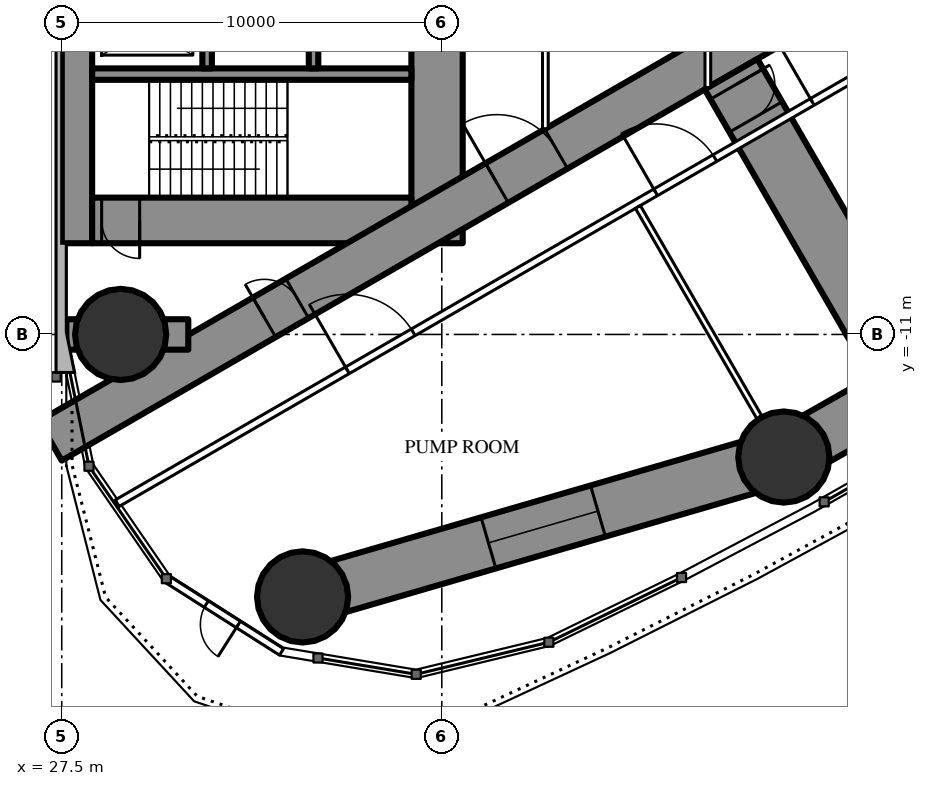
"""IFC4 building model, lengths in metres.
Left out: names, types, materials, properties, quantities, classifications, styles, units other than length and angle.
Written with IfcOpenShell. Run it as: python <this file> out.ifc"""

import sys

from ifc_helpers import new_model, si_unit, direction, frame, frame_2d, origin, origin_2d, place, context, subcontext, project, spatial, rectangle, circle, hollow_circle, extrude, element, fill, save


model = new_model("IFC4")
c1 = context("Model", 3, precision=1e-05, world=origin(), true_north=direction((0.0, 1.0)))
c2 = subcontext(c1, "Body", "Model", "MODEL_VIEW")
j1 = project(units=[si_unit("LENGTHUNIT", "METRE"), si_unit("PLANEANGLEUNIT", "RADIAN")], contexts=[c1])
p1 = place(None, origin())
s1 = spatial("IfcSite", under=j1, at=p1, CompositionType="ELEMENT")
p2 = place(p1, origin())
s2 = spatial("IfcBuilding", under=s1, at=p2, CompositionType="ELEMENT")
p3 = place(p2, frame((0.0, 0.0, 210.3)))
s3 = spatial("IfcBuildingStorey", under=s2, at=p3, CompositionType="ELEMENT", Elevation=210.3)
p4 = place(p3, frame((33.837, -17.906, 0.0), z_axis=(0.0, 0.0, 1.0), x_axis=(1.0, 0.0, 0.0)))
e1 = element("IfcColumn", 1, at=p4, inside=s3, PredefinedType="COLUMN", context=c2, shape_type="SweptSolid", body=[
    extrude(circle(Radius=1.2, at=origin_2d()), origin(), (0.0, 0.0, 1.0), 5.0),
])
p5 = place(p3, frame((29.05, -11.0, 0.0), z_axis=(0.0, 0.0, 1.0), x_axis=(1.0, 0.0, 0.0)))
e2 = element("IfcColumn", 2, at=p5, inside=s3, PredefinedType="COLUMN", context=c2, shape_type="SweptSolid", body=[
    extrude(hollow_circle(Radius=1.2, WallThickness=0.09, at=origin_2d()), origin(), (0.0, 0.0, 1.0), 5.0),
])
p6 = place(p3, frame((46.499, -14.226, 0.0), z_axis=(0.0, 0.0, 1.0), x_axis=(1.0, 0.0, 0.0)))
e3 = element("IfcColumn", 3, at=p6, inside=s3, PredefinedType="COLUMN", context=c2, shape_type="SweptSolid", body=[
    extrude(circle(Radius=1.2, at=origin_2d()), origin(), (0.0, 0.0, 1.0), 5.0),
])
p7 = place(p3, frame((27.9, -8.6, 0.0), z_axis=(0.0, 0.0, 1.0), x_axis=(0.0, 1.0, 0.0)))
e4 = element("IfcWall", 4, at=p7, inside=s3, PredefinedType="SHEAR", context=c2, shape_type="SweptSolid", body=[
    extrude(rectangle(XDim=17.2, YDim=0.8, at=frame_2d((8.6, 0.0))), origin(), (0.0, 0.0, 1.0), 5.0),
])
p8 = place(p7, frame((9.35, 0.0, 0.0)))
e5 = element("IfcOpeningElement", 5, at=p8, cuts=e4, PredefinedType="OPENING", context=c2, shape_type="SweptSolid", body=[
    extrude(rectangle(XDim=0.9, YDim=2.2, at=frame_2d((0.45, 1.1))), frame((0.0, 0.41, 0.0), z_axis=(0.0, -1.0, 0.0), x_axis=(1.0, 0.0, 0.0)), (0.0, 0.0, 1.0), 0.82),
])
p9 = place(p3, frame((37.375, -8.6, 0.0), z_axis=(0.0, 0.0, 1.0), x_axis=(0.0, 1.0, 0.0)))
e6 = element("IfcWall", 6, at=p9, inside=s3, PredefinedType="SHEAR", context=c2, shape_type="SweptSolid", body=[
    extrude(rectangle(XDim=17.2, YDim=1.35, at=frame_2d((8.6, 0.0))), origin(), (0.0, 0.0, 1.0), 5.0),
])
p10 = place(p9, frame((7.7, 0.0, 0.0)))
e7 = element("IfcOpeningElement", 7, at=p10, cuts=e6, PredefinedType="OPENING", context=c2, shape_type="SweptSolid", body=[
    extrude(rectangle(XDim=1.8, YDim=2.2, at=frame_2d((0.9, 1.1))), frame((0.0, 0.685, 0.0), z_axis=(0.0, -1.0, 0.0), x_axis=(1.0, 0.0, 0.0)), (0.0, 0.0, 1.0), 1.37),
])
p11 = place(p3, frame((28.3, -8.0, 0.0), z_axis=(0.0, 0.0, 1.0), x_axis=(1.0, 0.0, 0.0)))
e8 = element("IfcWall", 8, at=p11, inside=s3, PredefinedType="SHEAR", context=c2, shape_type="SweptSolid", body=[
    extrude(rectangle(XDim=8.4, YDim=1.2, at=frame_2d((4.2, 0.0))), origin(), (0.0, 0.0, 1.0), 5.0),
])
p12 = place(p11, frame((0.25, 0.0, 0.0)))
e9 = element("IfcOpeningElement", 9, at=p12, cuts=e8, PredefinedType="OPENING", context=c2, shape_type="SweptSolid", body=[
    extrude(rectangle(XDim=1.0, YDim=2.2, at=frame_2d((0.5, 1.1))), frame((0.0, 0.61, 0.0), z_axis=(0.0, -1.0, 0.0), x_axis=(1.0, 0.0, 0.0)), (0.0, 0.0, 1.0), 1.22),
])
p13 = place(p3, frame((28.3, -4.15, 0.0), z_axis=(0.0, 0.0, 1.0), x_axis=(1.0, 0.0, 0.0)))
e10 = element("IfcWall", 10, at=p13, inside=s3, PredefinedType="SHEAR", context=c2, shape_type="SweptSolid", body=[
    extrude(rectangle(XDim=8.4, YDim=0.3, at=frame_2d((4.2, 0.0))), origin(), (0.0, 0.0, 1.0), 5.0),
])
p14 = place(p3, frame((31.325, -4.0, 0.0), z_axis=(0.0, 0.0, 1.0), x_axis=(0.0, 1.0, 0.0)))
e11 = element("IfcWall", 11, at=p14, inside=s3, PredefinedType="SHEAR", context=c2, shape_type="SweptSolid", body=[
    extrude(rectangle(XDim=2.1, YDim=0.25, at=frame_2d((1.05, 0.0))), origin(), (0.0, 0.0, 1.0), 5.0),
])
p15 = place(p14, frame((0.5, 0.0, 0.0)))
e12 = element("IfcOpeningElement", 12, at=p15, cuts=e11, PredefinedType="OPENING", context=c2, shape_type="SweptSolid", body=[
    extrude(rectangle(XDim=1.1, YDim=2.2, at=frame_2d((0.55, 1.1))), frame((0.0, 0.135, 0.0), z_axis=(0.0, -1.0, 0.0), x_axis=(1.0, 0.0, 0.0)), (0.0, 0.0, 1.0), 0.27),
])
p16 = place(p3, frame((34.125, -4.0, 0.0), z_axis=(0.0, 0.0, 1.0), x_axis=(0.0, 1.0, 0.0)))
e13 = element("IfcWall", 13, at=p16, inside=s3, PredefinedType="SHEAR", context=c2, shape_type="SweptSolid", body=[
    extrude(rectangle(XDim=2.35, YDim=0.25, at=frame_2d((1.175, 0.0))), origin(), (0.0, 0.0, 1.0), 5.0),
])
p17 = place(p3, frame((27.2, -13.8, 0.0), z_axis=(0.0, 0.0, 1.0), x_axis=(0.866027159892, 0.499996958321, 0.0)))
e14 = element("IfcWall", 14, at=p17, inside=s3, PredefinedType="SHEAR", context=c2, shape_type="SweptSolid", body=[
    extrude(rectangle(XDim=27.947, YDim=1.2, at=frame_2d((13.973, 0.0))), origin(), (0.0, 0.0, 1.0), 5.0),
])
p18 = place(p17, frame((6.5, 0.0, 0.0)))
e15 = element("IfcOpeningElement", 15, at=p18, cuts=e14, PredefinedType="OPENING", context=c2, shape_type="SweptSolid", body=[
    extrude(rectangle(XDim=1.0, YDim=2.2, at=frame_2d((0.5, 1.1))), frame((0.0, 0.61, 0.0), z_axis=(0.0, -1.0, 0.0), x_axis=(1.0, 0.0, 0.0)), (0.0, 0.0, 1.0), 1.22),
])
p19 = place(p17, frame((13.568, 0.0, 0.0)))
e16 = element("IfcOpeningElement", 16, at=p19, cuts=e14, PredefinedType="OPENING", context=c2, shape_type="SweptSolid", body=[
    extrude(rectangle(XDim=1.8, YDim=2.2, at=frame_2d((0.9, 1.1))), frame((0.0, 0.61, 0.0), z_axis=(0.0, -1.0, 0.0), x_axis=(1.0, 0.0, 0.0)), (0.0, 0.0, 1.0), 1.22),
])
p20 = place(p3, frame((27.62, -11.0, 0.0), z_axis=(0.0, 0.0, 1.0), x_axis=(1.0, 0.0, 0.0)))
e17 = element("IfcWall", 17, at=p20, inside=s3, PredefinedType="SHEAR", context=c2, shape_type="SweptSolid", body=[
    extrude(rectangle(XDim=3.209, YDim=0.8, at=frame_2d((1.605, 0.0))), origin(), (0.0, 0.0, 1.0), 5.0),
])
p21 = place(p3, frame((45.111, -4.152, 0.0), z_axis=(0.0, 0.0, 1.0), x_axis=(0.499986466662, -0.86603321712, 0.0)))
e18 = element("IfcWall", 18, at=p21, inside=s3, PredefinedType="SHEAR", context=c2, shape_type="SweptSolid", body=[
    extrude(rectangle(XDim=9.446, YDim=1.6, at=frame_2d((4.723, 0.0))), origin(), (0.0, 0.0, 1.0), 5.0),
])
p22 = place(p21, frame((0.3, 0.0, 0.0)))
e19 = element("IfcOpeningElement", 19, at=p22, cuts=e18, PredefinedType="OPENING", context=c2, shape_type="SweptSolid", body=[
    extrude(rectangle(XDim=1.0, YDim=2.2, at=frame_2d((0.5, 1.1))), frame((0.0, 0.81, 0.0), z_axis=(0.0, -1.0, 0.0), x_axis=(1.0, 0.0, 0.0)), (0.0, 0.0, 1.0), 1.62),
])
p23 = place(p3, frame((33.837, -17.906, 0.0), z_axis=(0.0, 0.0, 1.0), x_axis=(0.960258384252, 0.279112585659, 0.0)))
e20 = element("IfcWall", 20, at=p23, inside=s3, PredefinedType="SHEAR", context=c2, shape_type="SweptSolid", body=[
    extrude(rectangle(XDim=13.186, YDim=1.4, at=frame_2d((6.593, 0.0))), origin(), (0.0, 0.0, 1.0), 5.0),
])
p24 = place(p23, frame((5.093, 0.0, 0.6)))
e21 = element("IfcOpeningElement", 21, at=p24, cuts=e20, PredefinedType="OPENING", context=c2, shape_type="SweptSolid", body=[
    extrude(rectangle(XDim=3.0, YDim=1.2, at=frame_2d((1.5, 0.6))), frame((0.0, 0.71, 0.0), z_axis=(0.0, -1.0, 0.0), x_axis=(1.0, 0.0, 0.0)), (0.0, 0.0, 1.0), 1.42),
])
p25 = place(p3, frame((46.499, -14.226, 0.0), z_axis=(0.0, 0.0, 1.0), x_axis=(0.869560321562, 0.493826738001, 0.0)))
e22 = element("IfcWall", 22, at=p25, inside=s3, PredefinedType="SHEAR", context=c2, shape_type="SweptSolid", body=[
    extrude(rectangle(XDim=3.835, YDim=1.4, at=frame_2d((1.917, 0.0))), origin(), (0.0, 0.0, 1.0), 5.0),
])
p26 = place(p3, frame((33.283, -19.354, 0.0), z_axis=(0.0, 0.0, 1.0), x_axis=(-0.843840574659, 0.536593966196, 0.0)))
e23 = element("IfcWall", 23, at=p26, inside=s3, PredefinedType="STANDARD", context=c2, shape_type="SweptSolid", body=[
    extrude(rectangle(XDim=3.592, YDim=0.2, at=frame_2d((1.796, 0.0))), origin(), (0.0, 0.0, 1.0), 4.75),
])
p27 = place(p26, frame((1.346, 0.0, 0.0)))
e24 = element("IfcOpeningElement", 24, at=p27, cuts=e23, PredefinedType="OPENING", context=c2, shape_type="SweptSolid", body=[
    extrude(rectangle(XDim=1.0, YDim=2.2, at=frame_2d((0.5, 1.1))), frame((0.0, 0.11, 0.0), z_axis=(0.0, -1.0, 0.0), x_axis=(1.0, 0.0, 0.0)), (0.0, 0.0, 1.0), 0.22),
])
p28 = place(p3, frame((28.959, -15.44, 0.0), z_axis=(0.0, 0.0, 1.0), x_axis=(0.866025227435, 0.500000305447, 0.0)))
e25 = element("IfcWall", 25, at=p28, inside=s3, PredefinedType="PARTITIONING", context=c2, shape_type="SweptSolid", body=[
    extrude(rectangle(XDim=30.88, YDim=0.2, at=frame_2d((15.44, 0.0))), origin(), (0.0, 0.0, 1.0), 4.75),
])
p29 = place(p28, frame((6.994, 0.0, 0.0)))
e26 = element("IfcOpeningElement", 26, at=p29, cuts=e25, PredefinedType="OPENING", context=c2, shape_type="SweptSolid", body=[
    extrude(rectangle(XDim=2.0, YDim=2.4, at=frame_2d((1.0, 1.2))), frame((0.0, 0.11, 0.0), z_axis=(0.0, -1.0, 0.0), x_axis=(1.0, 0.0, 0.0)), (0.0, 0.0, 1.0), 0.22),
])
p30 = place(p28, frame((16.36, 0.0, 0.0)))
e27 = element("IfcOpeningElement", 27, at=p30, cuts=e25, PredefinedType="OPENING", context=c2, shape_type="SweptSolid", body=[
    extrude(rectangle(XDim=1.8, YDim=2.2, at=frame_2d((0.9, 1.1))), frame((0.0, 0.11, 0.0), z_axis=(0.0, -1.0, 0.0), x_axis=(1.0, 0.0, 0.0)), (0.0, 0.0, 1.0), 0.22),
])
p31 = place(p28, frame((21.118, 0.0, 0.0)))
e28 = element("IfcOpeningElement", 28, at=p31, cuts=e25, PredefinedType="OPENING", context=c2, shape_type="SweptSolid", body=[
    extrude(rectangle(XDim=1.8, YDim=2.2, at=frame_2d((0.9, 1.1))), frame((0.0, 0.11, 0.0), z_axis=(0.0, -1.0, 0.0), x_axis=(1.0, 0.0, 0.0)), (0.0, 0.0, 1.0), 0.22),
])
p32 = place(p28, frame((25.341, 0.0, 0.0)))
e29 = element("IfcOpeningElement", 29, at=p32, cuts=e25, PredefinedType="OPENING", context=c2, shape_type="SweptSolid", body=[
    extrude(rectangle(XDim=1.8, YDim=2.2, at=frame_2d((0.9, 1.1))), frame((0.0, 0.11, 0.0), z_axis=(0.0, -1.0, 0.0), x_axis=(1.0, 0.0, 0.0)), (0.0, 0.0, 1.0), 0.22),
])
p33 = place(p3, frame((42.66, -7.646, 0.0), z_axis=(0.0, 0.0, 1.0), x_axis=(0.499996592859, -0.866027370889, 0.0)))
e30 = element("IfcWall", 30, at=p33, inside=s3, PredefinedType="PARTITIONING", context=c2, shape_type="SweptSolid", body=[
    extrude(rectangle(XDim=6.398, YDim=0.15, at=frame_2d((3.199, 0.0))), origin(), (0.0, 0.0, 1.0), 3.85),
])
p34 = place(p3, frame((40.225, -5.587, 0.0), z_axis=(0.0, 0.0, 1.0), x_axis=(0.0, 1.0, 0.0)))
e31 = element("IfcWall", 31, at=p34, inside=s3, PredefinedType="PARTITIONING", context=c2, shape_type="SweptSolid", body=[
    extrude(rectangle(XDim=11.174, YDim=0.15, at=frame_2d((5.587, 0.0))), origin(), (0.0, 0.0, 1.0), 4.75),
])
p35 = place(p34, frame((4.687, 0.0, 0.0)))
e32 = element("IfcOpeningElement", 32, at=p35, cuts=e31, PredefinedType="OPENING", context=c2, shape_type="SweptSolid", body=[
    extrude(rectangle(XDim=1.8, YDim=2.2, at=frame_2d((0.9, 1.1))), frame((0.0, 0.085, 0.0), z_axis=(0.0, -1.0, 0.0), x_axis=(1.0, 0.0, 0.0)), (0.0, 0.0, 1.0), 0.17),
])
p36 = place(p3, frame((44.5, -4.505, 0.0), z_axis=(0.0, 0.0, 1.0), x_axis=(0.0, 1.0, 0.0)))
e33 = element("IfcWall", 33, at=p36, inside=s3, PredefinedType="PARTITIONING", context=c2, shape_type="SweptSolid", body=[
    extrude(rectangle(XDim=9.009, YDim=0.15, at=frame_2d((4.505, 0.0))), origin(), (0.0, 0.0, 1.0), 4.75),
])
p37 = place(p36, frame((4.005, 0.0, 0.0)))
e34 = element("IfcOpeningElement", 34, at=p37, cuts=e33, PredefinedType="OPENING", context=c2, shape_type="SweptSolid", body=[
    extrude(rectangle(XDim=1.0, YDim=2.2, at=frame_2d((0.5, 1.1))), frame((0.0, 0.085, 0.0), z_axis=(0.0, -1.0, 0.0), x_axis=(1.0, 0.0, 0.0)), (0.0, 0.0, 1.0), 0.17),
])
p38 = place(p24, origin())
e35 = element("IfcWindow", 35, at=p38, inside=s3, PartitioningType="SINGLE_PANEL", PredefinedType="WINDOW", context=c2, shape_type="SweptSolid", body=[
    extrude(rectangle(XDim=3.0, YDim=1.2, at=frame_2d((1.5, 0.6))), frame((0.0, 0.03, 0.0), z_axis=(0.0, -1.0, 0.0), x_axis=(1.0, 0.0, 0.0)), (0.0, 0.0, 1.0), 0.06),
])
fill(e21, e35)
p39 = place(p27, origin())
e36 = element("IfcDoor", 36, at=p39, inside=s3, OperationType="SINGLE_SWING_LEFT", PredefinedType="DOOR", context=c2, shape_type="SweptSolid", body=[
    extrude(rectangle(XDim=1.0, YDim=2.2, at=frame_2d((0.5, 1.1))), frame((0.0, 0.025, 0.0), z_axis=(0.0, -1.0, 0.0), x_axis=(1.0, 0.0, 0.0)), (0.0, 0.0, 1.0), 0.05),
])
fill(e24, e36)
p40 = place(p22, origin())
e37 = element("IfcDoor", 37, at=p40, inside=s3, OperationType="SINGLE_SWING_LEFT", PredefinedType="DOOR", context=c2, shape_type="SweptSolid", body=[
    extrude(rectangle(XDim=1.0, YDim=2.2, at=frame_2d((0.5, 1.1))), frame((0.0, 0.025, 0.0), z_axis=(0.0, -1.0, 0.0), x_axis=(1.0, 0.0, 0.0)), (0.0, 0.0, 1.0), 0.05),
])
fill(e19, e37)
p41 = place(p29, origin())
e38 = element("IfcDoor", 38, at=p41, inside=s3, OperationType="DOUBLE_DOOR_SINGLE_SWING", PredefinedType="DOOR", context=c2, shape_type="SweptSolid", body=[
    extrude(rectangle(XDim=2.0, YDim=2.4, at=frame_2d((1.0, 1.2))), frame((0.0, 0.025, 0.0), z_axis=(0.0, -1.0, 0.0), x_axis=(1.0, 0.0, 0.0)), (0.0, 0.0, 1.0), 0.05),
])
fill(e26, e38)
p42 = place(p30, origin())
e39 = element("IfcDoor", 39, at=p42, inside=s3, OperationType="DOUBLE_DOOR_SINGLE_SWING", PredefinedType="DOOR", context=c2, shape_type="SweptSolid", body=[
    extrude(rectangle(XDim=1.8, YDim=2.2, at=frame_2d((0.9, 1.1))), frame((0.0, 0.025, 0.0), z_axis=(0.0, -1.0, 0.0), x_axis=(1.0, 0.0, 0.0)), (0.0, 0.0, 1.0), 0.05),
])
fill(e27, e39)
p43 = place(p31, origin())
e40 = element("IfcDoor", 40, at=p43, inside=s3, OperationType="DOUBLE_DOOR_SINGLE_SWING", PredefinedType="DOOR", context=c2, shape_type="SweptSolid", body=[
    extrude(rectangle(XDim=1.8, YDim=2.2, at=frame_2d((0.9, 1.1))), frame((0.0, 0.025, 0.0), z_axis=(0.0, -1.0, 0.0), x_axis=(1.0, 0.0, 0.0)), (0.0, 0.0, 1.0), 0.05),
])
fill(e28, e40)
p44 = place(p18, origin())
e41 = element("IfcDoor", 41, at=p44, inside=s3, OperationType="SINGLE_SWING_LEFT", PredefinedType="DOOR", context=c2, shape_type="SweptSolid", body=[
    extrude(rectangle(XDim=1.0, YDim=2.2, at=frame_2d((0.5, 1.1))), frame((0.0, 0.025, 0.0), z_axis=(0.0, -1.0, 0.0), x_axis=(1.0, 0.0, 0.0)), (0.0, 0.0, 1.0), 0.05),
])
fill(e15, e41)
p45 = place(p19, origin())
e42 = element("IfcDoor", 42, at=p45, inside=s3, OperationType="DOUBLE_DOOR_SINGLE_SWING", PredefinedType="DOOR", context=c2, shape_type="SweptSolid", body=[
    extrude(rectangle(XDim=1.8, YDim=2.2, at=frame_2d((0.9, 1.1))), frame((0.0, 0.025, 0.0), z_axis=(0.0, -1.0, 0.0), x_axis=(1.0, 0.0, 0.0)), (0.0, 0.0, 1.0), 0.05),
])
fill(e16, e42)
p46 = place(p12, origin())
e43 = element("IfcDoor", 43, at=p46, inside=s3, OperationType="SINGLE_SWING_RIGHT", PredefinedType="DOOR", context=c2, shape_type="SweptSolid", body=[
    extrude(rectangle(XDim=1.0, YDim=2.2, at=frame_2d((0.5, 1.1))), frame((0.0, 0.025, 0.0), z_axis=(0.0, -1.0, 0.0), x_axis=(1.0, 0.0, 0.0)), (0.0, 0.0, 1.0), 0.05),
])
fill(e9, e43)
save(model, sys.argv[1])
